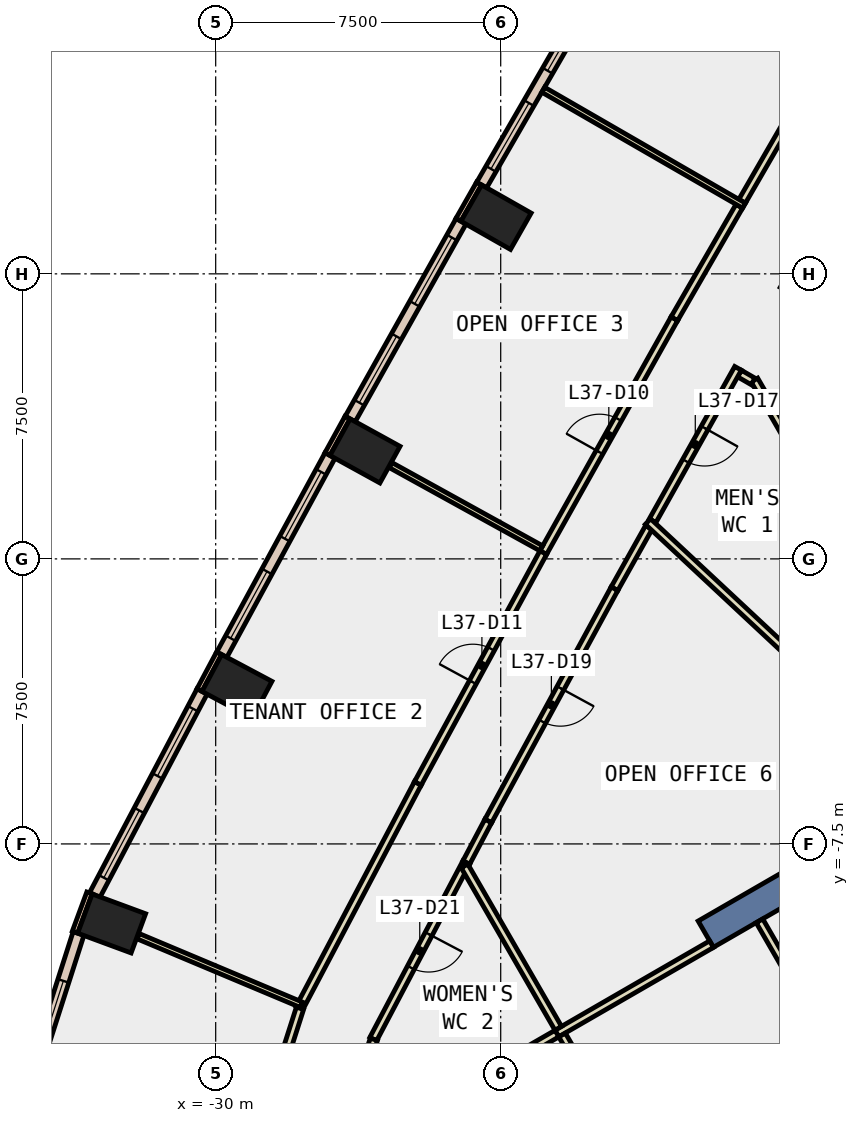
"""IFC4 building model, lengths in metres.
Left out: names, types, materials, properties, quantities, classifications, styles, units other than length and angle.
Written with IfcOpenShell. Run it as: python <this file> out.ifc"""

import sys

from ifc_helpers import new_model, si_unit, direction, frame, frame_2d, origin, origin_2d, place, context, subcontext, project, spatial, rectangle, extrude, element, fill, save


model = new_model("IFC4")
c1 = context("Model", 3, precision=1e-05, world=origin(), true_north=direction((0.0, 1.0)))
c2 = subcontext(c1, "Body", "Model", "MODEL_VIEW")
j1 = project(units=[si_unit("LENGTHUNIT", "METRE"), si_unit("PLANEANGLEUNIT", "RADIAN")], contexts=[c1])
p1 = place(None, origin())
s1 = spatial("IfcSite", under=j1, at=p1, CompositionType="ELEMENT")
p2 = place(p1, origin())
s2 = spatial("IfcBuilding", under=s1, at=p2, CompositionType="ELEMENT")
p3 = place(p2, frame((0.0, 0.0, 167.6)))
s3 = spatial("IfcBuildingStorey", under=s2, at=p3, CompositionType="ELEMENT", Elevation=167.6)
for number, where, z_axis, x_axis in (
    (1, (-22.623, 8.991, -0.4), (0.0, 0.0, 1.0), (0.494, 0.869, 0.0)),
    (2, (-26.071, 2.841, -0.4), (0.0, 0.0, 1.0), (0.482, 0.876, 0.0)),
    (3, (-29.44, -3.355, -0.4), (0.0, 0.0, 1.0), (0.47, 0.883, 0.0)),
    (4, (-32.738, -9.593, -0.4), (0.0, 0.0, 1.0), (0.347, 0.938, 0.0)),
):
    element("IfcColumn", number, at=place(p3, frame(where, z_axis=z_axis, x_axis=x_axis)), inside=s3, PredefinedType="COLUMN", context=c2, shape_type="SweptSolid", body=[
        extrude(rectangle(XDim=1.1, YDim=1.5, at=origin_2d()), origin(), (0.0, 0.0, 1.0), 4.2),
    ])
p4 = place(p3, frame((-9.31, -5.375, -0.4), z_axis=(0.0, 0.0, 1.0), x_axis=(-0.866017533419, -0.500013631625, 0.0)))
e5 = element("IfcWall", 5, at=p4, inside=s3, PredefinedType="SHEAR", context=c2, shape_type="SweptSolid", body=[
    extrude(rectangle(XDim=9.0, YDim=0.8, at=frame_2d((4.5, 0.0))), origin(), (0.0, 0.0, 1.0), 4.2),
])
p5 = place(p3, frame((-23.069, 9.877, 0.0), z_axis=(0.0, 0.0, 1.0), x_axis=(-0.494512685492, -0.869170411305, 0.0)))
e6 = element("IfcWall", 6, at=p5, inside=s3, PredefinedType="STANDARD", context=c2, shape_type="SweptSolid", body=[
    extrude(rectangle(XDim=1.1, YDim=0.15, at=frame_2d((0.55, 0.0))), origin(), (0.0, 0.0, 1.0), 3.8),
])
for number, where, z_axis, x_axis in (
    (7, (-26.529, 3.721, 0.0), (0.0, 0.0, 1.0), (-0.482, -0.876, 0.0)),
    (8, (-29.909, -2.482, 0.0), (0.0, 0.0, 1.0), (-0.47, -0.883, 0.0)),
    (9, (-33.321, -8.791, 0.0), (0.0, 0.0, 1.0), (-0.346, -0.938, 0.0)),
):
    element("IfcWall", number, at=place(p3, frame(where, z_axis=z_axis, x_axis=x_axis)), inside=s3, PredefinedType="STANDARD", context=c2, shape_type="SweptSolid", body=[
        extrude(rectangle(XDim=1.1, YDim=0.15, at=frame_2d((0.55, 0.0))), origin(), (0.0, 0.0, 1.0), 3.8),
    ])
p6 = place(p3, frame((-20.02, 15.002, 0.0), z_axis=(0.0, 0.0, 1.0), x_axis=(-0.49986421087, -0.866103787482, 0.0)))
e10 = element("IfcWall", 10, at=p6, inside=s3, PredefinedType="STANDARD", context=c2, shape_type="SweptSolid", body=[
    extrude(rectangle(XDim=5.964, YDim=0.3, at=frame_2d((2.982, 0.0))), origin(), (0.0, 0.0, 1.0), 3.8),
])
p7 = place(p6, frame((0.491, 0.0, 0.9)))
e11 = element("IfcOpeningElement", 11, at=p7, cuts=e10, PredefinedType="OPENING", context=c2, shape_type="SweptSolid", body=[
    extrude(rectangle(XDim=2.0, YDim=2.6, at=frame_2d((1.0, 1.3))), frame((0.0, 0.16, 0.0), z_axis=(0.0, -1.0, 0.0), x_axis=(1.0, 0.0, 0.0)), (0.0, 0.0, 1.0), 0.32),
])
p8 = place(p6, frame((3.473, 0.0, 0.9)))
e12 = element("IfcOpeningElement", 12, at=p8, cuts=e10, PredefinedType="OPENING", context=c2, shape_type="SweptSolid", body=[
    extrude(rectangle(XDim=2.0, YDim=2.6, at=frame_2d((1.0, 1.3))), frame((0.0, 0.16, 0.0), z_axis=(0.0, -1.0, 0.0), x_axis=(1.0, 0.0, 0.0)), (0.0, 0.0, 1.0), 0.32),
])
p9 = place(p3, frame((-23.544, 8.883, 0.0), z_axis=(0.0, 0.0, 1.0), x_axis=(-0.489032196971, -0.87226573378, 0.0)))
e13 = element("IfcWall", 13, at=p9, inside=s3, PredefinedType="STANDARD", context=c2, shape_type="SweptSolid", body=[
    extrude(rectangle(XDim=5.963, YDim=0.3, at=frame_2d((2.981, 0.0))), origin(), (0.0, 0.0, 1.0), 3.8),
])
p10 = place(p9, frame((0.491, 0.0, 0.9)))
e14 = element("IfcOpeningElement", 14, at=p10, cuts=e13, PredefinedType="OPENING", context=c2, shape_type="SweptSolid", body=[
    extrude(rectangle(XDim=2.0, YDim=2.6, at=frame_2d((1.0, 1.3))), frame((0.0, 0.16, 0.0), z_axis=(0.0, -1.0, 0.0), x_axis=(1.0, 0.0, 0.0)), (0.0, 0.0, 1.0), 0.32),
])
p11 = place(p9, frame((3.472, 0.0, 0.9)))
e15 = element("IfcOpeningElement", 15, at=p11, cuts=e13, PredefinedType="OPENING", context=c2, shape_type="SweptSolid", body=[
    extrude(rectangle(XDim=2.0, YDim=2.6, at=frame_2d((1.0, 1.3))), frame((0.0, 0.16, 0.0), z_axis=(0.0, -1.0, 0.0), x_axis=(1.0, 0.0, 0.0)), (0.0, 0.0, 1.0), 0.32),
])
p12 = place(p3, frame((-26.991, 2.72, 0.0), z_axis=(0.0, 0.0, 1.0), x_axis=(-0.477555226268, -0.878601733361, 0.0)))
e16 = element("IfcWall", 16, at=p12, inside=s3, PredefinedType="STANDARD", context=c2, shape_type="SweptSolid", body=[
    extrude(rectangle(XDim=5.964, YDim=0.3, at=frame_2d((2.982, 0.0))), origin(), (0.0, 0.0, 1.0), 3.8),
])
p13 = place(p12, frame((0.491, 0.0, 0.9)))
e17 = element("IfcOpeningElement", 17, at=p13, cuts=e16, PredefinedType="OPENING", context=c2, shape_type="SweptSolid", body=[
    extrude(rectangle(XDim=2.0, YDim=2.6, at=frame_2d((1.0, 1.3))), frame((0.0, 0.16, 0.0), z_axis=(0.0, -1.0, 0.0), x_axis=(1.0, 0.0, 0.0)), (0.0, 0.0, 1.0), 0.32),
])
p14 = place(p12, frame((3.473, 0.0, 0.9)))
e18 = element("IfcOpeningElement", 18, at=p14, cuts=e16, PredefinedType="OPENING", context=c2, shape_type="SweptSolid", body=[
    extrude(rectangle(XDim=2.0, YDim=2.6, at=frame_2d((1.0, 1.3))), frame((0.0, 0.16, 0.0), z_axis=(0.0, -1.0, 0.0), x_axis=(1.0, 0.0, 0.0)), (0.0, 0.0, 1.0), 0.32),
])
p15 = place(p3, frame((-30.358, -3.488, 0.0), z_axis=(0.0, 0.0, 1.0), x_axis=(-0.466399410196, -0.884574242316, 0.0)))
e19 = element("IfcWall", 19, at=p15, inside=s3, PredefinedType="STANDARD", context=c2, shape_type="SweptSolid", body=[
    extrude(rectangle(XDim=6.055, YDim=0.3, at=frame_2d((3.027, 0.0))), origin(), (0.0, 0.0, 1.0), 3.8),
])
p16 = place(p15, frame((0.514, 0.0, 0.9)))
e20 = element("IfcOpeningElement", 20, at=p16, cuts=e19, PredefinedType="OPENING", context=c2, shape_type="SweptSolid", body=[
    extrude(rectangle(XDim=2.0, YDim=2.6, at=frame_2d((1.0, 1.3))), frame((0.0, 0.16, 0.0), z_axis=(0.0, -1.0, 0.0), x_axis=(1.0, 0.0, 0.0)), (0.0, 0.0, 1.0), 0.32),
])
p17 = place(p15, frame((3.541, 0.0, 0.9)))
e21 = element("IfcOpeningElement", 21, at=p17, cuts=e19, PredefinedType="OPENING", context=c2, shape_type="SweptSolid", body=[
    extrude(rectangle(XDim=2.0, YDim=2.6, at=frame_2d((1.0, 1.3))), frame((0.0, 0.16, 0.0), z_axis=(0.0, -1.0, 0.0), x_axis=(1.0, 0.0, 0.0)), (0.0, 0.0, 1.0), 0.32),
])
p18 = place(p3, frame((-33.609, -9.856, 0.0), z_axis=(0.0, 0.0, 1.0), x_axis=(-0.305018133869, -0.952346543025, 0.0)))
e22 = element("IfcWall", 22, at=p18, inside=s3, PredefinedType="STANDARD", context=c2, shape_type="SweptSolid", body=[
    extrude(rectangle(XDim=4.02, YDim=0.3, at=frame_2d((2.01, 0.0))), origin(), (0.0, 0.0, 1.0), 3.8),
])
p19 = place(p18, frame((1.31, 0.0, 0.9)))
e23 = element("IfcOpeningElement", 23, at=p19, cuts=e22, PredefinedType="OPENING", context=c2, shape_type="SweptSolid", body=[
    extrude(rectangle(XDim=1.4, YDim=2.6, at=frame_2d((0.7, 1.3))), frame((0.0, 0.16, 0.0), z_axis=(0.0, -1.0, 0.0), x_axis=(1.0, 0.0, 0.0)), (0.0, 0.0, 1.0), 0.32),
])
p20 = place(p3, frame((-14.154, 1.815, 0.0), z_axis=(0.0, 0.0, 1.0), x_axis=(-0.500038857296, 0.866002968352, 0.0)))
e24 = element("IfcWall", 24, at=p20, inside=s3, PredefinedType="PARTITIONING", context=c2, shape_type="SweptSolid", body=[
    extrude(rectangle(XDim=3.34, YDim=0.2, at=frame_2d((1.67, 0.0))), origin(), (0.0, 0.0, 1.0), 3.8),
])
p21 = place(p3, frame((-15.86, 4.671, 0.0), z_axis=(0.0, 0.0, 1.0), x_axis=(-0.866047486323, 0.49996174997, 0.0)))
e25 = element("IfcWall", 25, at=p21, inside=s3, PredefinedType="PARTITIONING", context=c2, shape_type="SweptSolid", body=[
    extrude(rectangle(XDim=0.412, YDim=0.2, at=frame_2d((0.206, 0.0))), origin(), (0.0, 0.0, 1.0), 3.8),
])
p22 = place(p3, frame((-16.255, 5.014, 0.0), z_axis=(0.0, 0.0, 1.0), x_axis=(-0.488988017817, -0.87229050117, 0.0)))
e26 = element("IfcWall", 26, at=p22, inside=s3, PredefinedType="PARTITIONING", context=c2, shape_type="SweptSolid", body=[
    extrude(rectangle(XDim=4.599, YDim=0.2, at=frame_2d((2.3, 0.0))), origin(), (0.0, 0.0, 1.0), 3.8),
])
p23 = place(p22, frame((1.8, 0.0, 0.0)))
e27 = element("IfcOpeningElement", 27, at=p23, cuts=e26, PredefinedType="OPENING", context=c2, shape_type="SweptSolid", body=[
    extrude(rectangle(XDim=1.0, YDim=2.1, at=frame_2d((0.5, 1.05))), frame((0.0, 0.11, 0.0), z_axis=(0.0, -1.0, 0.0), x_axis=(1.0, 0.0, 0.0)), (0.0, 0.0, 1.0), 0.22),
])
p24 = place(p3, frame((-18.602, 0.828, 0.0), z_axis=(0.0, 0.0, 1.0), x_axis=(-0.488969229043, -0.872301033502, 0.0)))
e28 = element("IfcWall", 28, at=p24, inside=s3, PredefinedType="PARTITIONING", context=c2, shape_type="SweptSolid", body=[
    extrude(rectangle(XDim=1.849, YDim=0.2, at=frame_2d((0.924, 0.0))), origin(), (0.0, 0.0, 1.0), 3.8),
])
p25 = place(p3, frame((-19.506, -0.785, 0.0), z_axis=(0.0, 0.0, 1.0), x_axis=(-0.477513909405, -0.878624189472, 0.0)))
e29 = element("IfcWall", 29, at=p25, inside=s3, PredefinedType="PARTITIONING", context=c2, shape_type="SweptSolid", body=[
    extrude(rectangle(XDim=6.956, YDim=0.2, at=frame_2d((3.478, 0.0))), origin(), (0.0, 0.0, 1.0), 3.8),
])
p26 = place(p25, frame((2.978, 0.0, 0.0)))
e30 = element("IfcOpeningElement", 30, at=p26, cuts=e29, PredefinedType="OPENING", context=c2, shape_type="SweptSolid", body=[
    extrude(rectangle(XDim=1.0, YDim=2.1, at=frame_2d((0.5, 1.05))), frame((0.0, 0.11, 0.0), z_axis=(0.0, -1.0, 0.0), x_axis=(1.0, 0.0, 0.0)), (0.0, 0.0, 1.0), 0.22),
])
p27 = place(p3, frame((-22.828, -6.897, 0.0), z_axis=(0.0, 0.0, 1.0), x_axis=(-0.467225806893, -0.884138023938, 0.0)))
e31 = element("IfcWall", 31, at=p27, inside=s3, PredefinedType="PARTITIONING", context=c2, shape_type="SweptSolid", body=[
    extrude(rectangle(XDim=1.237, YDim=0.2, at=frame_2d((0.619, 0.0))), origin(), (0.0, 0.0, 1.0), 3.8),
])
p28 = place(p3, frame((-23.406, -7.991, 0.0), z_axis=(0.0, 0.0, 1.0), x_axis=(-0.466307932558, -0.884622468646, 0.0)))
e32 = element("IfcWall", 32, at=p28, inside=s3, PredefinedType="PARTITIONING", context=c2, shape_type="SweptSolid", body=[
    extrude(rectangle(XDim=5.25, YDim=0.2, at=frame_2d((2.625, 0.0))), origin(), (0.0, 0.0, 1.0), 3.8),
])
p29 = place(p28, frame((2.125, 0.0, 0.0)))
e33 = element("IfcOpeningElement", 33, at=p29, cuts=e32, PredefinedType="OPENING", context=c2, shape_type="SweptSolid", body=[
    extrude(rectangle(XDim=1.0, YDim=2.1, at=frame_2d((0.5, 1.05))), frame((0.0, 0.11, 0.0), z_axis=(0.0, -1.0, 0.0), x_axis=(1.0, 0.0, 0.0)), (0.0, 0.0, 1.0), 0.22),
])
p30 = place(p3, frame((-25.838, -12.642, 0.0), z_axis=(0.0, 0.0, 1.0), x_axis=(-0.305169069368, -0.952298188122, 0.0)))
e34 = element("IfcWall", 34, at=p30, inside=s3, PredefinedType="PARTITIONING", context=c2, shape_type="SweptSolid", body=[
    extrude(rectangle(XDim=2.117, YDim=0.2, at=frame_2d((1.059, 0.0))), origin(), (0.0, 0.0, 1.0), 3.8),
])
p31 = place(p3, frame((-16.147, 9.41, 0.0), z_axis=(0.0, 0.0, 1.0), x_axis=(0.500044178772, 0.865999895656, 0.0)))
e35 = element("IfcWall", 35, at=p31, inside=s3, PredefinedType="PARTITIONING", context=c2, shape_type="SweptSolid", body=[
    extrude(rectangle(XDim=3.416, YDim=0.2, at=frame_2d((1.708, 0.0))), origin(), (0.0, 0.0, 1.0), 3.8),
])
p32 = place(p3, frame((-21.381, 0.165, 0.0), z_axis=(0.0, 0.0, 1.0), x_axis=(0.489014139272, 0.872275857509, 0.0)))
e36 = element("IfcWall", 36, at=p32, inside=s3, PredefinedType="PARTITIONING", context=c2, shape_type="SweptSolid", body=[
    extrude(rectangle(XDim=7.057, YDim=0.2, at=frame_2d((3.529, 0.0))), origin(), (0.0, 0.0, 1.0), 3.8),
])
p33 = place(p32, frame((3.029, 0.0, 0.0)))
e37 = element("IfcOpeningElement", 37, at=p33, cuts=e36, PredefinedType="OPENING", context=c2, shape_type="SweptSolid", body=[
    extrude(rectangle(XDim=1.0, YDim=2.1, at=frame_2d((0.5, 1.05))), frame((0.0, 0.11, 0.0), z_axis=(0.0, -1.0, 0.0), x_axis=(1.0, 0.0, 0.0)), (0.0, 0.0, 1.0), 0.22),
])
p34 = place(p3, frame((-17.93, 6.321, 0.0), z_axis=(0.0, 0.0, 1.0), x_axis=(0.499920397431, 0.866071357471, 0.0)))
e38 = element("IfcWall", 38, at=p34, inside=s3, PredefinedType="PARTITIONING", context=c2, shape_type="SweptSolid", body=[
    extrude(rectangle(XDim=3.417, YDim=0.2, at=frame_2d((1.708, 0.0))), origin(), (0.0, 0.0, 1.0), 3.8),
])
p35 = place(p3, frame((-27.798, -11.819, 0.0), z_axis=(0.0, 0.0, 1.0), x_axis=(0.466450727507, 0.884547182918, 0.0)))
e39 = element("IfcWall", 39, at=p35, inside=s3, PredefinedType="PARTITIONING", context=c2, shape_type="SweptSolid", body=[
    extrude(rectangle(XDim=6.685, YDim=0.2, at=frame_2d((3.342, 0.0))), origin(), (0.0, 0.0, 1.0), 3.8),
])
p36 = place(p3, frame((-24.68, -5.906, 0.0), z_axis=(0.0, 0.0, 1.0), x_axis=(0.47757676389, 0.878590026459, 0.0)))
e40 = element("IfcWall", 40, at=p36, inside=s3, PredefinedType="PARTITIONING", context=c2, shape_type="SweptSolid", body=[
    extrude(rectangle(XDim=6.91, YDim=0.2, at=frame_2d((3.455, 0.0))), origin(), (0.0, 0.0, 1.0), 3.8),
])
p37 = place(p36, frame((3.029, 0.0, 0.0)))
e41 = element("IfcOpeningElement", 41, at=p37, cuts=e40, PredefinedType="OPENING", context=c2, shape_type="SweptSolid", body=[
    extrude(rectangle(XDim=1.0, YDim=2.1, at=frame_2d((0.5, 1.05))), frame((0.0, 0.11, 0.0), z_axis=(0.0, -1.0, 0.0), x_axis=(1.0, 0.0, 0.0)), (0.0, 0.0, 1.0), 0.22),
])
p38 = place(p3, frame((-28.663, -14.577, 0.0), z_axis=(0.0, 0.0, 1.0), x_axis=(0.304925942137, 0.952376065329, 0.0)))
e42 = element("IfcWall", 42, at=p38, inside=s3, PredefinedType="PARTITIONING", context=c2, shape_type="SweptSolid", body=[
    extrude(rectangle(XDim=2.89, YDim=0.2, at=frame_2d((1.445, 0.0))), origin(), (0.0, 0.0, 1.0), 3.8),
])
p39 = place(p3, frame((-11.372, -5.79, 0.0), z_axis=(0.0, 0.0, 1.0), x_axis=(-0.730922728623, 0.682460229451, 0.0)))
e43 = element("IfcWall", 43, at=p39, inside=s3, PredefinedType="PARTITIONING", context=c2, shape_type="SweptSolid", body=[
    extrude(rectangle(XDim=9.924, YDim=0.2, at=frame_2d((4.962, 0.0))), origin(), (0.0, 0.0, 1.0), 3.8),
])
p40 = place(p3, frame((-13.736, -12.909, 0.0), z_axis=(0.0, 0.0, 1.0), x_axis=(-0.49990810406, 0.866078453429, 0.0)))
e44 = element("IfcWall", 44, at=p40, inside=s3, PredefinedType="PARTITIONING", context=c2, shape_type="SweptSolid", body=[
    extrude(rectangle(XDim=3.908, YDim=0.2, at=frame_2d((1.954, 0.0))), origin(), (0.0, 0.0, 1.0), 3.8),
])
p41 = place(p3, frame((-16.952, -10.138, 0.0), z_axis=(0.0, 0.0, 1.0), x_axis=(-0.866054992606, -0.499948747156, 0.0)))
e45 = element("IfcWall", 45, at=p41, inside=s3, PredefinedType="PARTITIONING", context=c2, shape_type="SweptSolid", body=[
    extrude(rectangle(XDim=4.701, YDim=0.2, at=frame_2d((2.35, 0.0))), origin(), (0.0, 0.0, 1.0), 3.8),
])
p42 = place(p3, frame((-20.986, -12.351, 0.0), z_axis=(0.0, 0.0, 1.0), x_axis=(-0.499993851206, 0.866028953763, 0.0)))
e46 = element("IfcWall", 46, at=p42, inside=s3, PredefinedType="PARTITIONING", context=c2, shape_type="SweptSolid", body=[
    extrude(rectangle(XDim=4.932, YDim=0.2, at=frame_2d((2.466, 0.0))), origin(), (0.0, 0.0, 1.0), 3.8),
])
p43 = place(p3, frame((-18.366, -16.89, 0.0), z_axis=(0.0, 0.0, 1.0), x_axis=(-0.499965828395, 0.866045131871, 0.0)))
e47 = element("IfcWall", 47, at=p43, inside=s3, PredefinedType="PARTITIONING", context=c2, shape_type="SweptSolid", body=[
    extrude(rectangle(XDim=5.036, YDim=0.2, at=frame_2d((2.518, 0.0))), origin(), (0.0, 0.0, 1.0), 3.8),
])
p44 = place(p3, frame((-21.021, -12.491, 0.0), z_axis=(0.0, 0.0, 1.0), x_axis=(-0.865966890845, -0.500101333692, 0.0)))
e48 = element("IfcWall", 48, at=p44, inside=s3, PredefinedType="PARTITIONING", context=c2, shape_type="SweptSolid", body=[
    extrude(rectangle(XDim=5.931, YDim=0.2, at=frame_2d((2.965, 0.0))), origin(), (0.0, 0.0, 1.0), 3.8),
])
p45 = place(p3, frame((-16.098, 9.295, 0.0), z_axis=(0.0, 0.0, 1.0), x_axis=(-0.866109615698, 0.499854112313, 0.0)))
e49 = element("IfcWall", 49, at=p45, inside=s3, PredefinedType="PARTITIONING", context=c2, shape_type="SweptSolid", body=[
    extrude(rectangle(XDim=6.1, YDim=0.15, at=frame_2d((3.05, 0.0))), origin(), (0.0, 0.0, 1.0), 3.8),
])
p46 = place(p3, frame((-21.432, 0.278, 0.0), z_axis=(0.0, 0.0, 1.0), x_axis=(-0.875412579047, 0.483376474857, 0.0)))
e50 = element("IfcWall", 50, at=p46, inside=s3, PredefinedType="PARTITIONING", context=c2, shape_type="SweptSolid", body=[
    extrude(rectangle(XDim=4.531, YDim=0.15, at=frame_2d((2.265, 0.0))), origin(), (0.0, 0.0, 1.0), 3.8),
])
p47 = place(p3, frame((-27.751, -11.73, 0.0), z_axis=(0.0, 0.0, 1.0), x_axis=(-0.92196786851, 0.387266380462, 0.0)))
e51 = element("IfcWall", 51, at=p47, inside=s3, PredefinedType="PARTITIONING", context=c2, shape_type="SweptSolid", body=[
    extrude(rectangle(XDim=4.653, YDim=0.15, at=frame_2d((2.327, 0.0))), origin(), (0.0, 0.0, 1.0), 3.8),
])
p48 = place(p7, origin())
e52 = element("IfcWindow", 52, at=p48, inside=s3, PartitioningType="SINGLE_PANEL", PredefinedType="WINDOW", context=c2, shape_type="SweptSolid", body=[
    extrude(rectangle(XDim=2.0, YDim=2.6, at=frame_2d((1.0, 1.3))), frame((0.0, 0.03, 0.0), z_axis=(0.0, -1.0, 0.0), x_axis=(1.0, 0.0, 0.0)), (0.0, 0.0, 1.0), 0.06),
])
fill(e11, e52)
p49 = place(p8, origin())
e53 = element("IfcWindow", 53, at=p49, inside=s3, PartitioningType="SINGLE_PANEL", PredefinedType="WINDOW", context=c2, shape_type="SweptSolid", body=[
    extrude(rectangle(XDim=2.0, YDim=2.6, at=frame_2d((1.0, 1.3))), frame((0.0, 0.03, 0.0), z_axis=(0.0, -1.0, 0.0), x_axis=(1.0, 0.0, 0.0)), (0.0, 0.0, 1.0), 0.06),
])
fill(e12, e53)
p50 = place(p10, origin())
e54 = element("IfcWindow", 54, at=p50, inside=s3, PartitioningType="SINGLE_PANEL", PredefinedType="WINDOW", context=c2, shape_type="SweptSolid", body=[
    extrude(rectangle(XDim=2.0, YDim=2.6, at=frame_2d((1.0, 1.3))), frame((0.0, 0.03, 0.0), z_axis=(0.0, -1.0, 0.0), x_axis=(1.0, 0.0, 0.0)), (0.0, 0.0, 1.0), 0.06),
])
fill(e14, e54)
p51 = place(p11, origin())
e55 = element("IfcWindow", 55, at=p51, inside=s3, PartitioningType="SINGLE_PANEL", PredefinedType="WINDOW", context=c2, shape_type="SweptSolid", body=[
    extrude(rectangle(XDim=2.0, YDim=2.6, at=frame_2d((1.0, 1.3))), frame((0.0, 0.03, 0.0), z_axis=(0.0, -1.0, 0.0), x_axis=(1.0, 0.0, 0.0)), (0.0, 0.0, 1.0), 0.06),
])
fill(e15, e55)
p52 = place(p13, origin())
e56 = element("IfcWindow", 56, at=p52, inside=s3, PartitioningType="SINGLE_PANEL", PredefinedType="WINDOW", context=c2, shape_type="SweptSolid", body=[
    extrude(rectangle(XDim=2.0, YDim=2.6, at=frame_2d((1.0, 1.3))), frame((0.0, 0.03, 0.0), z_axis=(0.0, -1.0, 0.0), x_axis=(1.0, 0.0, 0.0)), (0.0, 0.0, 1.0), 0.06),
])
fill(e17, e56)
p53 = place(p14, origin())
e57 = element("IfcWindow", 57, at=p53, inside=s3, PartitioningType="SINGLE_PANEL", PredefinedType="WINDOW", context=c2, shape_type="SweptSolid", body=[
    extrude(rectangle(XDim=2.0, YDim=2.6, at=frame_2d((1.0, 1.3))), frame((0.0, 0.03, 0.0), z_axis=(0.0, -1.0, 0.0), x_axis=(1.0, 0.0, 0.0)), (0.0, 0.0, 1.0), 0.06),
])
fill(e18, e57)
p54 = place(p16, origin())
e58 = element("IfcWindow", 58, at=p54, inside=s3, PartitioningType="SINGLE_PANEL", PredefinedType="WINDOW", context=c2, shape_type="SweptSolid", body=[
    extrude(rectangle(XDim=2.0, YDim=2.6, at=frame_2d((1.0, 1.3))), frame((0.0, 0.03, 0.0), z_axis=(0.0, -1.0, 0.0), x_axis=(1.0, 0.0, 0.0)), (0.0, 0.0, 1.0), 0.06),
])
fill(e20, e58)
p55 = place(p17, origin())
e59 = element("IfcWindow", 59, at=p55, inside=s3, PartitioningType="SINGLE_PANEL", PredefinedType="WINDOW", context=c2, shape_type="SweptSolid", body=[
    extrude(rectangle(XDim=2.0, YDim=2.6, at=frame_2d((1.0, 1.3))), frame((0.0, 0.03, 0.0), z_axis=(0.0, -1.0, 0.0), x_axis=(1.0, 0.0, 0.0)), (0.0, 0.0, 1.0), 0.06),
])
fill(e21, e59)
p56 = place(p19, origin())
e60 = element("IfcWindow", 60, at=p56, inside=s3, PartitioningType="SINGLE_PANEL", PredefinedType="WINDOW", context=c2, shape_type="SweptSolid", body=[
    extrude(rectangle(XDim=1.4, YDim=2.6, at=frame_2d((0.7, 1.3))), frame((0.0, 0.03, 0.0), z_axis=(0.0, -1.0, 0.0), x_axis=(1.0, 0.0, 0.0)), (0.0, 0.0, 1.0), 0.06),
])
fill(e23, e60)
p57 = place(p33, origin())
e61 = element("IfcDoor", 61, at=p57, inside=s3, OperationType="SINGLE_SWING_RIGHT", PredefinedType="DOOR", context=c2, shape_type="SweptSolid", body=[
    extrude(rectangle(XDim=1.0, YDim=2.1, at=frame_2d((0.5, 1.05))), frame((0.0, 0.025, 0.0), z_axis=(0.0, -1.0, 0.0), x_axis=(1.0, 0.0, 0.0)), (0.0, 0.0, 1.0), 0.05),
])
fill(e37, e61)
p58 = place(p37, origin())
e62 = element("IfcDoor", 62, at=p58, inside=s3, OperationType="SINGLE_SWING_LEFT", PredefinedType="DOOR", context=c2, shape_type="SweptSolid", body=[
    extrude(rectangle(XDim=1.0, YDim=2.1, at=frame_2d((0.5, 1.05))), frame((0.0, 0.025, 0.0), z_axis=(0.0, -1.0, 0.0), x_axis=(1.0, 0.0, 0.0)), (0.0, 0.0, 1.0), 0.05),
])
fill(e41, e62)
p59 = place(p23, origin())
e63 = element("IfcDoor", 63, at=p59, inside=s3, OperationType="SINGLE_SWING_LEFT", PredefinedType="DOOR", context=c2, shape_type="SweptSolid", body=[
    extrude(rectangle(XDim=1.0, YDim=2.1, at=frame_2d((0.5, 1.05))), frame((0.0, 0.025, 0.0), z_axis=(0.0, -1.0, 0.0), x_axis=(1.0, 0.0, 0.0)), (0.0, 0.0, 1.0), 0.05),
])
fill(e27, e63)
p60 = place(p26, origin())
e64 = element("IfcDoor", 64, at=p60, inside=s3, OperationType="SINGLE_SWING_LEFT", PredefinedType="DOOR", context=c2, shape_type="SweptSolid", body=[
    extrude(rectangle(XDim=1.0, YDim=2.1, at=frame_2d((0.5, 1.05))), frame((0.0, 0.025, 0.0), z_axis=(0.0, -1.0, 0.0), x_axis=(1.0, 0.0, 0.0)), (0.0, 0.0, 1.0), 0.05),
])
fill(e30, e64)
p61 = place(p29, origin())
e65 = element("IfcDoor", 65, at=p61, inside=s3, OperationType="SINGLE_SWING_LEFT", PredefinedType="DOOR", context=c2, shape_type="SweptSolid", body=[
    extrude(rectangle(XDim=1.0, YDim=2.1, at=frame_2d((0.5, 1.05))), frame((0.0, 0.025, 0.0), z_axis=(0.0, -1.0, 0.0), x_axis=(1.0, 0.0, 0.0)), (0.0, 0.0, 1.0), 0.05),
])
fill(e33, e65)
save(model, sys.argv[1])
